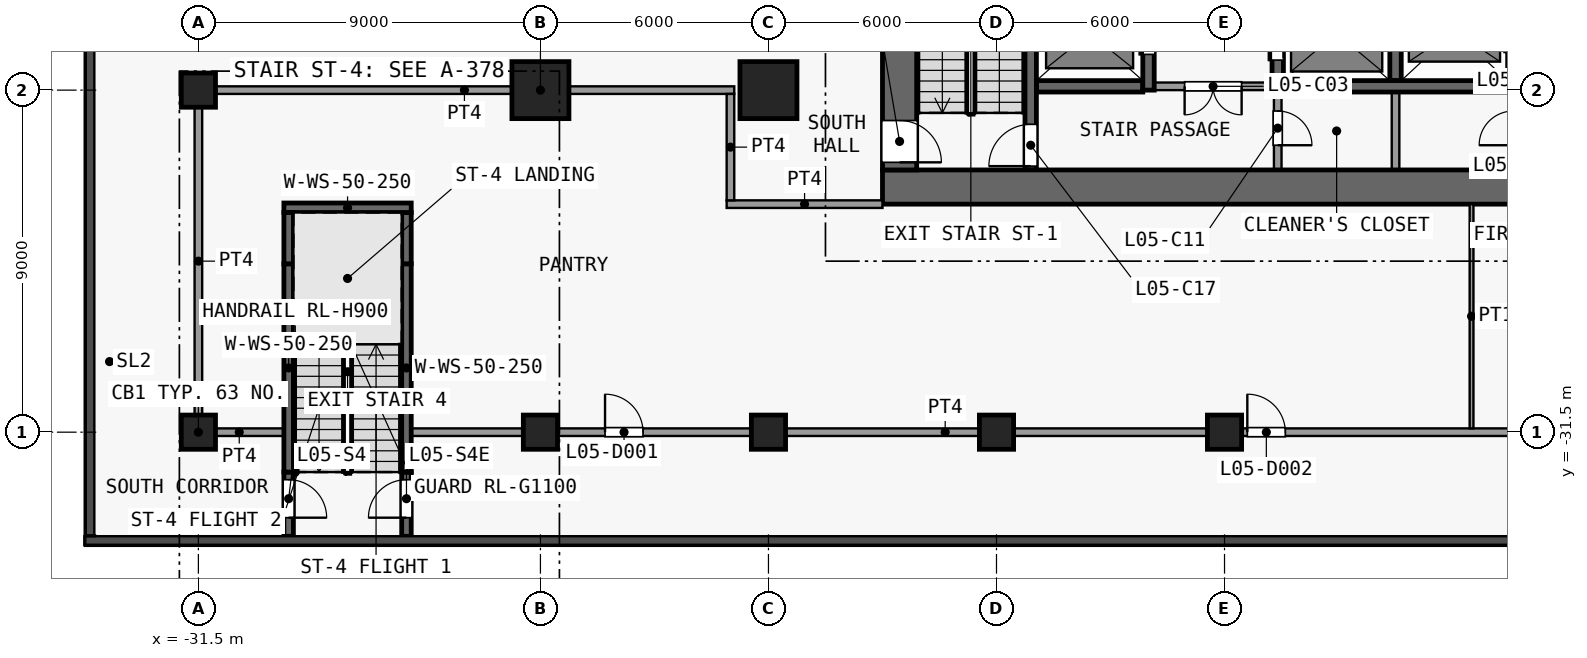
"""IFC4 building model, lengths in metres.
Left out: names, types, materials, properties, quantities, classifications, styles, units other than length and angle.
Written with IfcOpenShell. Run it as: python <this file> out.ifc"""

import sys

from ifc_helpers import new_model, si_unit, direction, frame, frame_2d, origin, origin_2d, place, context, subcontext, project, spatial, rectangle, extrude, element, fill, save


model = new_model("IFC4")
c1 = context("Model", 3, precision=1e-05, world=origin(), true_north=direction((0.0, 1.0)))
c2 = subcontext(c1, "Body", "Model", "MODEL_VIEW")
j1 = project(units=[si_unit("LENGTHUNIT", "METRE"), si_unit("PLANEANGLEUNIT", "RADIAN")], contexts=[c1])
p1 = place(None, origin())
s1 = spatial("IfcSite", under=j1, at=p1, CompositionType="ELEMENT")
p2 = place(p1, origin())
s2 = spatial("IfcBuilding", under=s1, at=p2, CompositionType="ELEMENT")
p3 = place(p2, frame((0.0, 0.0, 28.0)))
s3 = spatial("IfcBuildingStorey", under=s2, at=p3, CompositionType="ELEMENT", Elevation=28.0)
for number, where, z_axis, x_axis in (
    (1, (-31.5, -31.5, 0.0), (0.0, 0.0, 1.0), (1.0, 0.0, 0.0)),
    (2, (-31.5, -22.5, 0.0), (0.0, 0.0, 1.0), (1.0, 0.0, 0.0)),
    (3, (-22.5, -31.5, 0.0), (0.0, 0.0, 1.0), (1.0, 0.0, 0.0)),
):
    element("IfcColumn", number, at=place(p3, frame(where, z_axis=z_axis, x_axis=x_axis)), inside=s3, PredefinedType="COLUMN", context=c2, shape_type="SweptSolid", body=[
        extrude(rectangle(XDim=0.9, YDim=0.9, at=origin_2d()), origin(), (0.0, 0.0, 1.0), 4.5),
    ])
p4 = place(p3, frame((-22.5, -22.5, 0.0), z_axis=(0.0, 0.0, 1.0), x_axis=(1.0, 0.0, 0.0)))
e4 = element("IfcColumn", 4, at=p4, inside=s3, PredefinedType="COLUMN", context=c2, shape_type="SweptSolid", body=[
    extrude(rectangle(XDim=1.5, YDim=1.5, at=origin_2d()), origin(), (0.0, 0.0, 1.0), 4.5),
])
p5 = place(p3, frame((-16.5, -31.5, 0.0), z_axis=(0.0, 0.0, 1.0), x_axis=(1.0, 0.0, 0.0)))
e5 = element("IfcColumn", 5, at=p5, inside=s3, PredefinedType="COLUMN", context=c2, shape_type="SweptSolid", body=[
    extrude(rectangle(XDim=0.9, YDim=0.9, at=origin_2d()), origin(), (0.0, 0.0, 1.0), 4.5),
])
p6 = place(p3, frame((-16.5, -22.5, 0.0), z_axis=(0.0, 0.0, 1.0), x_axis=(1.0, 0.0, 0.0)))
e6 = element("IfcColumn", 6, at=p6, inside=s3, PredefinedType="COLUMN", context=c2, shape_type="SweptSolid", body=[
    extrude(rectangle(XDim=1.5, YDim=1.5, at=origin_2d()), origin(), (0.0, 0.0, 1.0), 4.5),
])
for number, where, z_axis, x_axis in (
    (7, (-10.5, -31.5, 0.0), (0.0, 0.0, 1.0), (1.0, 0.0, 0.0)),
    (8, (-4.5, -31.5, 0.0), (0.0, 0.0, 1.0), (1.0, 0.0, 0.0)),
):
    element("IfcColumn", number, at=place(p3, frame(where, z_axis=z_axis, x_axis=x_axis)), inside=s3, PredefinedType="COLUMN", context=c2, shape_type="SweptSolid", body=[
        extrude(rectangle(XDim=0.9, YDim=0.9, at=origin_2d()), origin(), (0.0, 0.0, 1.0), 4.5),
    ])
p7 = place(p3, frame((-13.5, -25.05, 0.0), z_axis=(0.0, 0.0, 1.0), x_axis=(1.0, 0.0, 0.0)))
e9 = element("IfcWall", 9, at=p7, inside=s3, PredefinedType="SHEAR", context=c2, shape_type="SweptSolid", body=[
    extrude(rectangle(XDim=27.0, YDim=0.9, at=frame_2d((13.5, 0.0))), origin(), (0.0, 0.0, 1.0), 4.1),
])
p8 = place(p3, frame((-13.05, -8.5, 0.0), z_axis=(0.0, 0.0, 1.0), x_axis=(0.0, -1.0, 0.0)))
e10 = element("IfcWall", 10, at=p8, inside=s3, PredefinedType="SHEAR", context=c2, shape_type="SweptSolid", body=[
    extrude(rectangle(XDim=16.1, YDim=0.9, at=frame_2d((8.05, 0.0))), origin(), (0.0, 0.0, 1.0), 4.1),
])
p9 = place(p8, frame((14.8, 0.0, 0.0)))
e11 = element("IfcOpeningElement", 11, at=p9, cuts=e10, PredefinedType="OPENING", context=c2, shape_type="SweptSolid", body=[
    extrude(rectangle(XDim=1.1, YDim=2.1, at=frame_2d((0.55, 1.05))), frame((0.0, 0.46, 0.0), z_axis=(0.0, -1.0, 0.0), x_axis=(1.0, 0.0, 0.0)), (0.0, 0.0, 1.0), 0.92),
])
p10 = place(p3, frame((-9.45, -22.4, 0.0), z_axis=(0.0, 0.0, 1.0), x_axis=(1.0, 0.0, 0.0)))
e12 = element("IfcWall", 12, at=p10, inside=s3, PredefinedType="SHEAR", context=c2, shape_type="SweptSolid", body=[
    extrude(rectangle(XDim=2.8, YDim=0.3, at=frame_2d((1.4, 0.0))), origin(), (0.0, 0.0, 1.0), 4.1),
])
p11 = place(p3, frame((-3.25, -22.4, 0.0), z_axis=(0.0, 0.0, 1.0), x_axis=(-1.0, 0.0, 0.0)))
e13 = element("IfcWall", 13, at=p11, inside=s3, PredefinedType="PARTITIONING", context=c2, shape_type="SweptSolid", body=[
    extrude(rectangle(XDim=3.1, YDim=0.2, at=frame_2d((1.55, 0.0))), origin(), (0.0, 0.0, 1.0), 4.1),
])
p12 = place(p11, frame((0.8, 0.0, 0.0)))
e14 = element("IfcOpeningElement", 14, at=p12, cuts=e13, PredefinedType="OPENING", context=c2, shape_type="SweptSolid", body=[
    extrude(rectangle(XDim=1.5, YDim=2.1, at=frame_2d((0.75, 1.05))), frame((0.0, 0.11, 0.0), z_axis=(0.0, -1.0, 0.0), x_axis=(1.0, 0.0, 0.0)), (0.0, 0.0, 1.0), 0.22),
])
p13 = place(p3, frame((-2.95, -22.4, 0.0), z_axis=(0.0, 0.0, 1.0), x_axis=(1.0, 0.0, 0.0)))
e15 = element("IfcWall", 15, at=p13, inside=s3, PredefinedType="SHEAR", context=c2, shape_type="SweptSolid", body=[
    extrude(rectangle(XDim=6.2, YDim=0.3, at=frame_2d((3.1, 0.0))), origin(), (0.0, 0.0, 1.0), 4.1),
])
p14 = place(p3, frame((-9.6, -24.6, 0.0), z_axis=(0.0, 0.0, 1.0), x_axis=(0.0, 1.0, 0.0)))
e16 = element("IfcWall", 16, at=p14, inside=s3, PredefinedType="SHEAR", context=c2, shape_type="SweptSolid", body=[
    extrude(rectangle(XDim=7.7, YDim=0.3, at=frame_2d((3.85, 0.0))), origin(), (0.0, 0.0, 1.0), 4.1),
])
p15 = place(p14, frame((0.1, 0.0, 0.0)))
e17 = element("IfcOpeningElement", 17, at=p15, cuts=e16, PredefinedType="OPENING", context=c2, shape_type="SweptSolid", body=[
    extrude(rectangle(XDim=1.1, YDim=2.1, at=frame_2d((0.55, 1.05))), frame((0.0, 0.16, 0.0), z_axis=(0.0, -1.0, 0.0), x_axis=(1.0, 0.0, 0.0)), (0.0, 0.0, 1.0), 0.32),
])
p16 = place(p3, frame((-6.5, -22.5, 0.0), z_axis=(0.0, 0.0, 1.0), x_axis=(0.0, 1.0, 0.0)))
e18 = element("IfcWall", 18, at=p16, inside=s3, PredefinedType="SHEAR", context=c2, shape_type="SweptSolid", body=[
    extrude(rectangle(XDim=14.0, YDim=0.3, at=frame_2d((7.0, 0.0))), origin(), (0.0, 0.0, 1.0), 4.1),
])
p17 = place(p16, frame((0.94, 0.0, 0.0)))
e19 = element("IfcOpeningElement", 19, at=p17, cuts=e18, PredefinedType="OPENING", context=c2, shape_type="SweptSolid", body=[
    extrude(rectangle(XDim=1.1, YDim=2.1, at=frame_2d((0.55, 1.05))), frame((0.0, 0.16, 0.0), z_axis=(0.0, -1.0, 0.0), x_axis=(1.0, 0.0, 0.0)), (0.0, 0.0, 1.0), 0.32),
])
p18 = place(p16, frame((3.72, 0.0, 0.0)))
e20 = element("IfcOpeningElement", 20, at=p18, cuts=e18, PredefinedType="OPENING", context=c2, shape_type="SweptSolid", body=[
    extrude(rectangle(XDim=1.1, YDim=2.1, at=frame_2d((0.55, 1.05))), frame((0.0, 0.16, 0.0), z_axis=(0.0, -1.0, 0.0), x_axis=(1.0, 0.0, 0.0)), (0.0, 0.0, 1.0), 0.32),
])
p19 = place(p16, frame((6.5, 0.0, 0.0)))
e21 = element("IfcOpeningElement", 21, at=p19, cuts=e18, PredefinedType="OPENING", context=c2, shape_type="SweptSolid", body=[
    extrude(rectangle(XDim=1.1, YDim=2.1, at=frame_2d((0.55, 1.05))), frame((0.0, 0.16, 0.0), z_axis=(0.0, -1.0, 0.0), x_axis=(1.0, 0.0, 0.0)), (0.0, 0.0, 1.0), 0.32),
])
p20 = place(p16, frame((9.28, 0.0, 0.0)))
e22 = element("IfcOpeningElement", 22, at=p20, cuts=e18, PredefinedType="OPENING", context=c2, shape_type="SweptSolid", body=[
    extrude(rectangle(XDim=1.1, YDim=2.1, at=frame_2d((0.55, 1.05))), frame((0.0, 0.16, 0.0), z_axis=(0.0, -1.0, 0.0), x_axis=(1.0, 0.0, 0.0)), (0.0, 0.0, 1.0), 0.32),
])
p21 = place(p16, frame((12.06, 0.0, 0.0)))
e23 = element("IfcOpeningElement", 23, at=p21, cuts=e18, PredefinedType="OPENING", context=c2, shape_type="SweptSolid", body=[
    extrude(rectangle(XDim=1.1, YDim=2.1, at=frame_2d((0.55, 1.05))), frame((0.0, 0.16, 0.0), z_axis=(0.0, -1.0, 0.0), x_axis=(1.0, 0.0, 0.0)), (0.0, 0.0, 1.0), 0.32),
])
p22 = place(p3, frame((-3.1, -22.55, 0.0), z_axis=(0.0, 0.0, 1.0), x_axis=(0.0, -1.0, 0.0)))
e24 = element("IfcWall", 24, at=p22, inside=s3, PredefinedType="PARTITIONING", context=c2, shape_type="SweptSolid", body=[
    extrude(rectangle(XDim=2.05, YDim=0.2, at=frame_2d((1.025, 0.0))), origin(), (0.0, 0.0, 1.0), 4.1),
])
p23 = place(p22, frame((0.5, 0.0, 0.0)))
e25 = element("IfcOpeningElement", 25, at=p23, cuts=e24, PredefinedType="OPENING", context=c2, shape_type="SweptSolid", body=[
    extrude(rectangle(XDim=0.9, YDim=2.1, at=frame_2d((0.45, 1.05))), frame((0.0, 0.11, 0.0), z_axis=(0.0, -1.0, 0.0), x_axis=(1.0, 0.0, 0.0)), (0.0, 0.0, 1.0), 0.22),
])
p24 = place(p3, frame((-3.1, -22.55, 0.0), z_axis=(0.0, 0.0, 1.0), x_axis=(0.0, 1.0, 0.0)))
e26 = element("IfcWall", 26, at=p24, inside=s3, PredefinedType="SHEAR", context=c2, shape_type="SweptSolid", body=[
    extrude(rectangle(XDim=14.05, YDim=0.3, at=frame_2d((7.025, 0.0))), origin(), (0.0, 0.0, 1.0), 4.1),
])
p25 = place(p24, frame((12.11, 0.0, 0.0)))
e27 = element("IfcOpeningElement", 27, at=p25, cuts=e26, PredefinedType="OPENING", context=c2, shape_type="SweptSolid", body=[
    extrude(rectangle(XDim=1.1, YDim=2.1, at=frame_2d((0.55, 1.05))), frame((0.0, 0.16, 0.0), z_axis=(0.0, -1.0, 0.0), x_axis=(1.0, 0.0, 0.0)), (0.0, 0.0, 1.0), 0.32),
])
p26 = place(p24, frame((0.84, 0.0, 0.0)))
e28 = element("IfcOpeningElement", 28, at=p26, cuts=e26, PredefinedType="OPENING", context=c2, shape_type="SweptSolid", body=[
    extrude(rectangle(XDim=1.4, YDim=2.1, at=frame_2d((0.7, 1.05))), frame((0.0, 0.16, 0.0), z_axis=(0.0, -1.0, 0.0), x_axis=(1.0, 0.0, 0.0)), (0.0, 0.0, 1.0), 0.32),
])
p27 = place(p3, frame((0.0, -24.6, 0.0), z_axis=(0.0, 0.0, 1.0), x_axis=(0.0, 1.0, 0.0)))
e29 = element("IfcWall", 29, at=p27, inside=s3, PredefinedType="PARTITIONING", context=c2, shape_type="SweptSolid", body=[
    extrude(rectangle(XDim=2.05, YDim=0.2, at=frame_2d((1.025, 0.0))), origin(), (0.0, 0.0, 1.0), 4.1),
])
p28 = place(p3, frame((0.0, -22.25, 0.0), z_axis=(0.0, 0.0, 1.0), x_axis=(0.0, 1.0, 0.0)))
e30 = element("IfcWall", 30, at=p28, inside=s3, PredefinedType="SHEAR", context=c2, shape_type="SweptSolid", body=[
    extrude(rectangle(XDim=13.75, YDim=0.3, at=frame_2d((6.875, 0.0))), origin(), (0.0, 0.0, 1.0), 4.1),
])
p29 = place(p3, frame((-29.125, -32.55, 0.0), z_axis=(0.0, 0.0, 1.0), x_axis=(0.0, -1.0, 0.0)))
e31 = element("IfcWall", 31, at=p29, inside=s3, PredefinedType="SHEAR", context=c2, shape_type="SweptSolid", body=[
    extrude(rectangle(XDim=1.69, YDim=0.25, at=frame_2d((0.845, 0.0))), origin(), (0.0, 0.0, 1.0), 4.1),
])
p30 = place(p29, frame((0.2, 0.0, 0.0)))
e32 = element("IfcOpeningElement", 32, at=p30, cuts=e31, PredefinedType="OPENING", context=c2, shape_type="SweptSolid", body=[
    extrude(rectangle(XDim=1.0, YDim=2.1, at=frame_2d((0.5, 1.05))), frame((0.0, 0.135, 0.0), z_axis=(0.0, -1.0, 0.0), x_axis=(1.0, 0.0, 0.0)), (0.0, 0.0, 1.0), 0.27),
])
p31 = place(p3, frame((-29.125, -32.55, 0.0), z_axis=(0.0, 0.0, 1.0), x_axis=(0.0, 1.0, 0.0)))
e33 = element("IfcWall", 33, at=p31, inside=s3, PredefinedType="SHEAR", context=c2, shape_type="SweptSolid", body=[
    extrude(rectangle(XDim=5.48, YDim=0.25, at=frame_2d((2.74, 0.0))), origin(), (0.0, 0.0, 1.0), 4.1),
])
p32 = place(p3, frame((-29.125, -27.07, 0.0), z_axis=(0.0, 0.0, 1.0), x_axis=(0.0, 1.0, 0.0)))
e34 = element("IfcWall", 34, at=p32, inside=s3, PredefinedType="SHEAR", context=c2, shape_type="SweptSolid", body=[
    extrude(rectangle(XDim=1.35, YDim=0.25, at=frame_2d((0.675, 0.0))), origin(), (0.0, 0.0, 1.0), 4.1),
])
p33 = place(p3, frame((-26.025, -34.24, 0.0), z_axis=(0.0, 0.0, 1.0), x_axis=(0.0, 1.0, 0.0)))
e35 = element("IfcWall", 35, at=p33, inside=s3, PredefinedType="SHEAR", context=c2, shape_type="SweptSolid", body=[
    extrude(rectangle(XDim=1.69, YDim=0.25, at=frame_2d((0.845, 0.0))), origin(), (0.0, 0.0, 1.0), 4.1),
])
p34 = place(p33, frame((0.49, 0.0, 0.0)))
e36 = element("IfcOpeningElement", 36, at=p34, cuts=e35, PredefinedType="OPENING", context=c2, shape_type="SweptSolid", body=[
    extrude(rectangle(XDim=1.0, YDim=2.1, at=frame_2d((0.5, 1.05))), frame((0.0, 0.135, 0.0), z_axis=(0.0, -1.0, 0.0), x_axis=(1.0, 0.0, 0.0)), (0.0, 0.0, 1.0), 0.27),
])
p35 = place(p3, frame((-26.025, -32.55, 0.0), z_axis=(0.0, 0.0, 1.0), x_axis=(0.0, 1.0, 0.0)))
e37 = element("IfcWall", 37, at=p35, inside=s3, PredefinedType="SHEAR", context=c2, shape_type="SweptSolid", body=[
    extrude(rectangle(XDim=5.48, YDim=0.25, at=frame_2d((2.74, 0.0))), origin(), (0.0, 0.0, 1.0), 4.1),
])
p36 = place(p3, frame((-26.025, -27.07, 0.0), z_axis=(0.0, 0.0, 1.0), x_axis=(0.0, 1.0, 0.0)))
e38 = element("IfcWall", 38, at=p36, inside=s3, PredefinedType="SHEAR", context=c2, shape_type="SweptSolid", body=[
    extrude(rectangle(XDim=1.35, YDim=0.25, at=frame_2d((0.675, 0.0))), origin(), (0.0, 0.0, 1.0), 4.1),
])
p37 = place(p3, frame((-29.25, -25.595, 0.0), z_axis=(0.0, 0.0, 1.0), x_axis=(1.0, 0.0, 0.0)))
e39 = element("IfcWall", 39, at=p37, inside=s3, PredefinedType="SHEAR", context=c2, shape_type="SweptSolid", body=[
    extrude(rectangle(XDim=3.35, YDim=0.25, at=frame_2d((1.675, 0.0))), origin(), (0.0, 0.0, 1.0), 4.1),
])
p38 = place(p3, frame((-31.6, -31.5, 0.0), z_axis=(0.0, 0.0, 1.0), x_axis=(1.0, 0.0, 0.0)))
e40 = element("IfcWall", 40, at=p38, inside=s3, PredefinedType="PARTITIONING", context=c2, shape_type="SweptSolid", body=[
    extrude(rectangle(XDim=2.35, YDim=0.2, at=frame_2d((1.175, 0.0))), origin(), (0.0, 0.0, 1.0), 4.1),
])
p39 = place(p3, frame((-25.9, -31.5, 0.0), z_axis=(0.0, 0.0, 1.0), x_axis=(1.0, 0.0, 0.0)))
e41 = element("IfcWall", 41, at=p39, inside=s3, PredefinedType="PARTITIONING", context=c2, shape_type="SweptSolid", body=[
    extrude(rectangle(XDim=78.15, YDim=0.2, at=frame_2d((39.075, 0.0))), origin(), (0.0, 0.0, 1.0), 4.1),
])
p40 = place(p39, frame((5.1, 0.0, 0.0)))
e42 = element("IfcOpeningElement", 42, at=p40, cuts=e41, PredefinedType="OPENING", context=c2, shape_type="SweptSolid", body=[
    extrude(rectangle(XDim=1.0, YDim=2.1, at=frame_2d((0.5, 1.05))), frame((0.0, 0.11, 0.0), z_axis=(0.0, -1.0, 0.0), x_axis=(1.0, 0.0, 0.0)), (0.0, 0.0, 1.0), 0.22),
])
p41 = place(p39, frame((22.0, 0.0, 0.0)))
e43 = element("IfcOpeningElement", 43, at=p41, cuts=e41, PredefinedType="OPENING", context=c2, shape_type="SweptSolid", body=[
    extrude(rectangle(XDim=1.0, YDim=2.1, at=frame_2d((0.5, 1.05))), frame((0.0, 0.11, 0.0), z_axis=(0.0, -1.0, 0.0), x_axis=(1.0, 0.0, 0.0)), (0.0, 0.0, 1.0), 0.22),
])
p42 = place(p39, frame((31.0, 0.0, 0.0)))
e44 = element("IfcOpeningElement", 44, at=p42, cuts=e41, PredefinedType="OPENING", context=c2, shape_type="SweptSolid", body=[
    extrude(rectangle(XDim=1.0, YDim=2.1, at=frame_2d((0.5, 1.05))), frame((0.0, 0.11, 0.0), z_axis=(0.0, -1.0, 0.0), x_axis=(1.0, 0.0, 0.0)), (0.0, 0.0, 1.0), 0.22),
])
p43 = place(p39, frame((34.8, 0.0, 0.0)))
e45 = element("IfcOpeningElement", 45, at=p43, cuts=e41, PredefinedType="OPENING", context=c2, shape_type="SweptSolid", body=[
    extrude(rectangle(XDim=1.0, YDim=2.1, at=frame_2d((0.5, 1.05))), frame((0.0, 0.11, 0.0), z_axis=(0.0, -1.0, 0.0), x_axis=(1.0, 0.0, 0.0)), (0.0, 0.0, 1.0), 0.22),
])
p44 = place(p39, frame((45.1, 0.0, 0.0)))
e46 = element("IfcOpeningElement", 46, at=p44, cuts=e41, PredefinedType="OPENING", context=c2, shape_type="SweptSolid", body=[
    extrude(rectangle(XDim=1.0, YDim=2.1, at=frame_2d((0.5, 1.05))), frame((0.0, 0.11, 0.0), z_axis=(0.0, -1.0, 0.0), x_axis=(1.0, 0.0, 0.0)), (0.0, 0.0, 1.0), 0.22),
])
p45 = place(p39, frame((58.0, 0.0, 0.0)))
e47 = element("IfcOpeningElement", 47, at=p45, cuts=e41, PredefinedType="OPENING", context=c2, shape_type="SweptSolid", body=[
    extrude(rectangle(XDim=1.8, YDim=2.1, at=frame_2d((0.9, 1.05))), frame((0.0, 0.11, 0.0), z_axis=(0.0, -1.0, 0.0), x_axis=(1.0, 0.0, 0.0)), (0.0, 0.0, 1.0), 0.22),
])
p46 = place(p39, frame((72.2, 0.0, 0.0)))
e48 = element("IfcOpeningElement", 48, at=p46, cuts=e41, PredefinedType="OPENING", context=c2, shape_type="SweptSolid", body=[
    extrude(rectangle(XDim=1.8, YDim=2.1, at=frame_2d((0.9, 1.05))), frame((0.0, 0.11, 0.0), z_axis=(0.0, -1.0, 0.0), x_axis=(1.0, 0.0, 0.0)), (0.0, 0.0, 1.0), 0.22),
])
p47 = place(p3, frame((-17.6, -25.5, 0.0), z_axis=(0.0, 0.0, 1.0), x_axis=(1.0, 0.0, 0.0)))
e49 = element("IfcWall", 49, at=p47, inside=s3, PredefinedType="PARTITIONING", context=c2, shape_type="SweptSolid", body=[
    extrude(rectangle(XDim=4.1, YDim=0.2, at=frame_2d((2.05, 0.0))), origin(), (0.0, 0.0, 1.0), 4.1),
])
p48 = place(p3, frame((-31.6, -22.5, 0.0), z_axis=(0.0, 0.0, 1.0), x_axis=(1.0, 0.0, 0.0)))
e50 = element("IfcWall", 50, at=p48, inside=s3, PredefinedType="PARTITIONING", context=c2, shape_type="SweptSolid", body=[
    extrude(rectangle(XDim=14.2, YDim=0.2, at=frame_2d((7.1, 0.0))), origin(), (0.0, 0.0, 1.0), 4.1),
])
p49 = place(p3, frame((-31.5, -31.4, 0.0), z_axis=(0.0, 0.0, 1.0), x_axis=(0.0, 1.0, 0.0)))
e51 = element("IfcWall", 51, at=p49, inside=s3, PredefinedType="PARTITIONING", context=c2, shape_type="SweptSolid", body=[
    extrude(rectangle(XDim=8.8, YDim=0.2, at=frame_2d((4.4, 0.0))), origin(), (0.0, 0.0, 1.0), 4.1),
])
p50 = place(p3, frame((-17.5, -25.4, 0.0), z_axis=(0.0, 0.0, 1.0), x_axis=(0.0, 1.0, 0.0)))
e52 = element("IfcWall", 52, at=p50, inside=s3, PredefinedType="PARTITIONING", context=c2, shape_type="SweptSolid", body=[
    extrude(rectangle(XDim=2.8, YDim=0.2, at=frame_2d((1.4, 0.0))), origin(), (0.0, 0.0, 1.0), 4.1),
])
p51 = place(p3, frame((2.0, -31.4, 0.0), z_axis=(0.0, 0.0, 1.0), x_axis=(0.0, 1.0, 0.0)))
e53 = element("IfcWall", 53, at=p51, inside=s3, PredefinedType="PARTITIONING", context=c2, shape_type="SweptSolid", body=[
    extrude(rectangle(XDim=5.9, YDim=0.1, at=frame_2d((2.95, 0.0))), origin(), (0.0, 0.0, 1.0), 4.1),
])
p52 = place(p17, origin())
e54 = element("IfcDoor", 54, at=p52, inside=s3, OperationType="DOUBLE_DOOR_SLIDING", PredefinedType="DOOR", context=c2, shape_type="SweptSolid", body=[
    extrude(rectangle(XDim=1.1, YDim=2.1, at=frame_2d((0.55, 1.05))), frame((0.0, 0.025, 0.0), z_axis=(0.0, -1.0, 0.0), x_axis=(1.0, 0.0, 0.0)), (0.0, 0.0, 1.0), 0.05),
])
fill(e19, e54)
p53 = place(p26, origin())
e55 = element("IfcDoor", 55, at=p53, inside=s3, OperationType="DOUBLE_DOOR_SLIDING", PredefinedType="DOOR", context=c2, shape_type="SweptSolid", body=[
    extrude(rectangle(XDim=1.4, YDim=2.1, at=frame_2d((0.7, 1.05))), frame((0.0, 0.025, 0.0), z_axis=(0.0, -1.0, 0.0), x_axis=(1.0, 0.0, 0.0)), (0.0, 0.0, 1.0), 0.05),
])
fill(e28, e55)
p54 = place(p12, origin())
e56 = element("IfcDoor", 56, at=p54, inside=s3, OperationType="DOUBLE_DOOR_SINGLE_SWING", PredefinedType="DOOR", context=c2, shape_type="SweptSolid", body=[
    extrude(rectangle(XDim=1.5, YDim=2.1, at=frame_2d((0.75, 1.05))), frame((0.0, 0.025, 0.0), z_axis=(0.0, -1.0, 0.0), x_axis=(1.0, 0.0, 0.0)), (0.0, 0.0, 1.0), 0.05),
])
fill(e14, e56)
p55 = place(p23, origin())
e57 = element("IfcDoor", 57, at=p55, inside=s3, OperationType="SINGLE_SWING_RIGHT", PredefinedType="DOOR", context=c2, shape_type="SweptSolid", body=[
    extrude(rectangle(XDim=0.9, YDim=2.1, at=frame_2d((0.45, 1.05))), frame((0.0, 0.025, 0.0), z_axis=(0.0, -1.0, 0.0), x_axis=(1.0, 0.0, 0.0)), (0.0, 0.0, 1.0), 0.05),
])
fill(e25, e57)
p56 = place(p15, origin())
e58 = element("IfcDoor", 58, at=p56, inside=s3, OperationType="SINGLE_SWING_LEFT", PredefinedType="DOOR", context=c2, shape_type="SweptSolid", body=[
    extrude(rectangle(XDim=1.1, YDim=2.1, at=frame_2d((0.55, 1.05))), frame((0.0, 0.025, 0.0), z_axis=(0.0, -1.0, 0.0), x_axis=(1.0, 0.0, 0.0)), (0.0, 0.0, 1.0), 0.05),
])
fill(e17, e58)
p57 = place(p9, origin())
e59 = element("IfcDoor", 59, at=p57, inside=s3, OperationType="SINGLE_SWING_RIGHT", PredefinedType="DOOR", context=c2, shape_type="SweptSolid", body=[
    extrude(rectangle(XDim=1.1, YDim=2.1, at=frame_2d((0.55, 1.05))), frame((0.0, 0.025, 0.0), z_axis=(0.0, -1.0, 0.0), x_axis=(1.0, 0.0, 0.0)), (0.0, 0.0, 1.0), 0.05),
])
fill(e11, e59)
p58 = place(p30, origin())
e60 = element("IfcDoor", 60, at=p58, inside=s3, OperationType="SINGLE_SWING_RIGHT", PredefinedType="DOOR", context=c2, shape_type="SweptSolid", body=[
    extrude(rectangle(XDim=1.0, YDim=2.1, at=frame_2d((0.5, 1.05))), frame((0.0, 0.025, 0.0), z_axis=(0.0, -1.0, 0.0), x_axis=(1.0, 0.0, 0.0)), (0.0, 0.0, 1.0), 0.05),
])
fill(e32, e60)
p59 = place(p34, origin())
e61 = element("IfcDoor", 61, at=p59, inside=s3, OperationType="SINGLE_SWING_LEFT", PredefinedType="DOOR", context=c2, shape_type="SweptSolid", body=[
    extrude(rectangle(XDim=1.0, YDim=2.1, at=frame_2d((0.5, 1.05))), frame((0.0, 0.025, 0.0), z_axis=(0.0, -1.0, 0.0), x_axis=(1.0, 0.0, 0.0)), (0.0, 0.0, 1.0), 0.05),
])
fill(e36, e61)
p60 = place(p40, origin())
e62 = element("IfcDoor", 62, at=p60, inside=s3, OperationType="SINGLE_SWING_RIGHT", PredefinedType="DOOR", context=c2, shape_type="SweptSolid", body=[
    extrude(rectangle(XDim=1.0, YDim=2.1, at=frame_2d((0.5, 1.05))), frame((0.0, 0.025, 0.0), z_axis=(0.0, -1.0, 0.0), x_axis=(1.0, 0.0, 0.0)), (0.0, 0.0, 1.0), 0.05),
])
fill(e42, e62)
p61 = place(p41, origin())
e63 = element("IfcDoor", 63, at=p61, inside=s3, OperationType="SINGLE_SWING_RIGHT", PredefinedType="DOOR", context=c2, shape_type="SweptSolid", body=[
    extrude(rectangle(XDim=1.0, YDim=2.1, at=frame_2d((0.5, 1.05))), frame((0.0, 0.025, 0.0), z_axis=(0.0, -1.0, 0.0), x_axis=(1.0, 0.0, 0.0)), (0.0, 0.0, 1.0), 0.05),
])
fill(e43, e63)
save(model, sys.argv[1])
